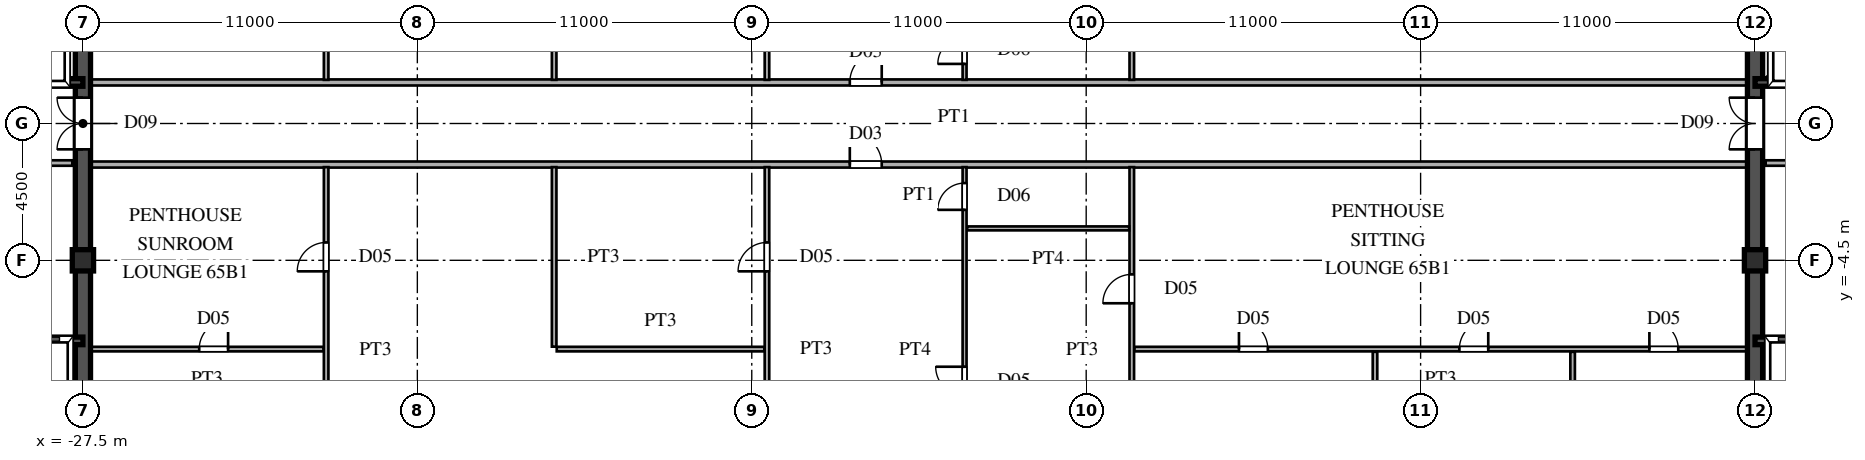
"""IFC4 building model, lengths in metres.
Left out: names, types, materials, properties, quantities, classifications, styles, units other than length and angle.
Written with IfcOpenShell. Run it as: python <this file> out.ifc"""

import sys

from ifc_helpers import new_model, si_unit, direction, frame, frame_2d, origin, origin_2d, place, context, subcontext, project, spatial, rectangle, hollow_rectangle, extrude, source, transform, mapped, element, fill, save


model = new_model("IFC4")
c1 = context("Model", 3, precision=1e-05, world=origin(), true_north=direction((0.0, 1.0)))
c2 = subcontext(c1, "Body", "Model", "MODEL_VIEW")
j1 = project(units=[si_unit("LENGTHUNIT", "METRE"), si_unit("PLANEANGLEUNIT", "RADIAN")], contexts=[c1])
p1 = place(None, origin())
s1 = spatial("IfcSite", under=j1, at=p1, CompositionType="ELEMENT")
p2 = place(p1, origin())
s2 = spatial("IfcBuilding", under=s1, at=p2, CompositionType="ELEMENT")
p3 = place(p2, frame((0.0, 0.0, 246.9)))
s3 = spatial("IfcBuildingStorey", under=s2, at=p3, CompositionType="ELEMENT", Elevation=246.9)
m1 = source(origin(), c2, "Body", "SweptSolid", [
    extrude(hollow_rectangle(XDim=0.7, YDim=0.7, WallThickness=0.03, at=origin_2d()), origin(), (0.0, 0.0, 1.0), 3.75),
])
for number, where, z_axis, x_axis in (
    (1, (-27.5, -4.5, 0.0), (0.0, 0.0, 1.0), (1.0, 0.0, 0.0)),
    (2, (27.5, -4.5, 0.0), (0.0, 0.0, 1.0), (1.0, 0.0, 0.0)),
):
    element("IfcColumn", number, at=place(p3, frame(where, z_axis=z_axis, x_axis=x_axis)), inside=s3, PredefinedType="COLUMN", context=c2, shape_type="MappedRepresentation", body=[
        mapped(m1, transform((0.0, 0.0, 0.0), scale=1.0)),
    ])
for number, where, z_axis, x_axis in (
    (3, (-27.5, -13.5, 0.0), (0.0, 0.0, 1.0), (0.0, 1.0, 0.0)),
    (4, (-27.5, 1.3, 0.0), (0.0, 0.0, 1.0), (0.0, 1.0, 0.0)),
):
    element("IfcWall", number, at=place(p3, frame(where, z_axis=z_axis, x_axis=x_axis)), inside=s3, PredefinedType="SHEAR", context=c2, shape_type="SweptSolid", body=[
        extrude(rectangle(XDim=12.2, YDim=0.5, at=frame_2d((6.1, 0.0))), origin(), (0.0, 0.0, 1.0), 3.53),
    ])
p4 = place(p3, frame((-27.5, -1.3, 0.0), z_axis=(0.0, 0.0, 1.0), x_axis=(0.0, 1.0, 0.0)))
e5 = element("IfcWall", 5, at=p4, inside=s3, PredefinedType="SHEAR", context=c2, shape_type="SweptSolid", body=[
    extrude(rectangle(XDim=2.6, YDim=0.5, at=frame_2d((1.3, 0.0))), origin(), (0.0, 0.0, 1.0), 3.53),
])
p5 = place(p4, frame((0.45, 0.0, 0.0)))
e6 = element("IfcOpeningElement", 6, at=p5, cuts=e5, PredefinedType="OPENING", context=c2, shape_type="SweptSolid", body=[
    extrude(rectangle(XDim=1.7, YDim=2.35, at=frame_2d((0.85, 1.175))), frame((0.0, 0.26, 0.0), z_axis=(0.0, -1.0, 0.0), x_axis=(1.0, 0.0, 0.0)), (0.0, 0.0, 1.0), 0.52),
])
for number, where, z_axis, x_axis in (
    (7, (-30.3, -7.15, 0.0), (0.0, 0.0, 1.0), (1.0, 0.0, 0.0)),
    (8, (-30.3, 1.35, 0.0), (0.0, 0.0, 1.0), (1.0, 0.0, 0.0)),
):
    element("IfcWall", number, at=place(p3, frame(where, z_axis=z_axis, x_axis=x_axis)), inside=s3, PredefinedType="SHEAR", context=c2, shape_type="SweptSolid", body=[
        extrude(rectangle(XDim=2.8, YDim=0.25, at=frame_2d((1.4, 0.0))), origin(), (0.0, 0.0, 1.0), 3.53),
    ])
p6 = place(p3, frame((-33.02, -1.3, 0.0), z_axis=(0.0, 0.0, 1.0), x_axis=(1.0, 0.0, 0.0)))
e9 = element("IfcWall", 9, at=p6, inside=s3, PredefinedType="PARTITIONING", context=c2, shape_type="SweptSolid", body=[
    extrude(rectangle(XDim=5.17, YDim=0.18, at=frame_2d((2.585, 0.0))), origin(), (0.0, 0.0, 1.0), 3.53),
])
p7 = place(p6, frame((2.01, 0.0, 0.0)))
e10 = element("IfcOpeningElement", 10, at=p7, cuts=e9, PredefinedType="OPENING", context=c2, shape_type="SweptSolid", body=[
    extrude(rectangle(XDim=1.15, YDim=2.2, at=frame_2d((0.575, 1.1))), frame((0.0, 0.1, 0.0), z_axis=(0.0, -1.0, 0.0), x_axis=(1.0, 0.0, 0.0)), (0.0, 0.0, 1.0), 0.2),
])
for number, where, z_axis, x_axis in (
    (11, (27.5, -13.5, 0.0), (0.0, 0.0, 1.0), (0.0, 1.0, 0.0)),
    (12, (27.5, 1.3, 0.0), (0.0, 0.0, 1.0), (0.0, 1.0, 0.0)),
):
    element("IfcWall", number, at=place(p3, frame(where, z_axis=z_axis, x_axis=x_axis)), inside=s3, PredefinedType="SHEAR", context=c2, shape_type="SweptSolid", body=[
        extrude(rectangle(XDim=12.2, YDim=0.5, at=frame_2d((6.1, 0.0))), origin(), (0.0, 0.0, 1.0), 3.53),
    ])
p8 = place(p3, frame((27.5, -1.3, 0.0), z_axis=(0.0, 0.0, 1.0), x_axis=(0.0, 1.0, 0.0)))
e13 = element("IfcWall", 13, at=p8, inside=s3, PredefinedType="SHEAR", context=c2, shape_type="SweptSolid", body=[
    extrude(rectangle(XDim=2.6, YDim=0.5, at=frame_2d((1.3, 0.0))), origin(), (0.0, 0.0, 1.0), 3.53),
])
p9 = place(p8, frame((0.45, 0.0, 0.0)))
e14 = element("IfcOpeningElement", 14, at=p9, cuts=e13, PredefinedType="OPENING", context=c2, shape_type="SweptSolid", body=[
    extrude(rectangle(XDim=1.7, YDim=2.35, at=frame_2d((0.85, 1.175))), frame((0.0, 0.26, 0.0), z_axis=(0.0, -1.0, 0.0), x_axis=(1.0, 0.0, 0.0)), (0.0, 0.0, 1.0), 0.52),
])
for number, where, z_axis, x_axis in (
    (15, (27.5, -7.15, 0.0), (0.0, 0.0, 1.0), (1.0, 0.0, 0.0)),
    (16, (27.5, 1.35, 0.0), (0.0, 0.0, 1.0), (1.0, 0.0, 0.0)),
):
    element("IfcWall", number, at=place(p3, frame(where, z_axis=z_axis, x_axis=x_axis)), inside=s3, PredefinedType="SHEAR", context=c2, shape_type="SweptSolid", body=[
        extrude(rectangle(XDim=2.8, YDim=0.25, at=frame_2d((1.4, 0.0))), origin(), (0.0, 0.0, 1.0), 3.53),
    ])
p10 = place(p3, frame((27.85, -1.3, 0.0), z_axis=(0.0, 0.0, 1.0), x_axis=(1.0, 0.0, 0.0)))
e17 = element("IfcWall", 17, at=p10, inside=s3, PredefinedType="PARTITIONING", context=c2, shape_type="SweptSolid", body=[
    extrude(rectangle(XDim=5.17, YDim=0.18, at=frame_2d((2.585, 0.0))), origin(), (0.0, 0.0, 1.0), 3.53),
])
p11 = place(p10, frame((2.01, 0.0, 0.0)))
e18 = element("IfcOpeningElement", 18, at=p11, cuts=e17, PredefinedType="OPENING", context=c2, shape_type="SweptSolid", body=[
    extrude(rectangle(XDim=1.15, YDim=2.2, at=frame_2d((0.575, 1.1))), frame((0.0, 0.1, 0.0), z_axis=(0.0, -1.0, 0.0), x_axis=(1.0, 0.0, 0.0)), (0.0, 0.0, 1.0), 0.2),
])
p12 = place(p3, frame((-27.245, -7.42, 0.0), z_axis=(0.0, 0.0, 1.0), x_axis=(1.0, 0.0, 0.0)))
e19 = element("IfcWall", 19, at=p12, inside=s3, PredefinedType="PARTITIONING", context=c2, shape_type="SweptSolid", body=[
    extrude(rectangle(XDim=7.66, YDim=0.15, at=frame_2d((3.83, 0.0))), origin(), (0.0, 0.0, 1.0), 3.53),
])
p13 = place(p12, frame((3.57, 0.0, 0.0)))
e20 = element("IfcOpeningElement", 20, at=p13, cuts=e19, PredefinedType="OPENING", context=c2, shape_type="SweptSolid", body=[
    extrude(rectangle(XDim=0.95, YDim=2.15, at=frame_2d((0.475, 1.075))), frame((0.0, 0.085, 0.0), z_axis=(0.0, -1.0, 0.0), x_axis=(1.0, 0.0, 0.0)), (0.0, 0.0, 1.0), 0.17),
])
p14 = place(p3, frame((-11.915, -7.42, 0.0), z_axis=(0.0, 0.0, 1.0), x_axis=(1.0, 0.0, 0.0)))
e21 = element("IfcWall", 21, at=p14, inside=s3, PredefinedType="PARTITIONING", context=c2, shape_type="SweptSolid", body=[
    extrude(rectangle(XDim=6.83, YDim=0.15, at=frame_2d((3.415, 0.0))), origin(), (0.0, 0.0, 1.0), 3.53),
])
p15 = place(p3, frame((7.085, -7.42, 0.0), z_axis=(0.0, 0.0, 1.0), x_axis=(1.0, 0.0, 0.0)))
e22 = element("IfcWall", 22, at=p15, inside=s3, PredefinedType="PARTITIONING", context=c2, shape_type="SweptSolid", body=[
    extrude(rectangle(XDim=20.16, YDim=0.15, at=frame_2d((10.08, 0.0))), origin(), (0.0, 0.0, 1.0), 3.53),
])
p16 = place(p15, frame((3.44, 0.0, 0.0)))
e23 = element("IfcOpeningElement", 23, at=p16, cuts=e22, PredefinedType="OPENING", context=c2, shape_type="SweptSolid", body=[
    extrude(rectangle(XDim=0.95, YDim=2.15, at=frame_2d((0.475, 1.075))), frame((0.0, 0.085, 0.0), z_axis=(0.0, -1.0, 0.0), x_axis=(1.0, 0.0, 0.0)), (0.0, 0.0, 1.0), 0.17),
])
p17 = place(p15, frame((10.69, 0.0, 0.0)))
e24 = element("IfcOpeningElement", 24, at=p17, cuts=e22, PredefinedType="OPENING", context=c2, shape_type="SweptSolid", body=[
    extrude(rectangle(XDim=0.95, YDim=2.15, at=frame_2d((0.475, 1.075))), frame((0.0, 0.085, 0.0), z_axis=(0.0, -1.0, 0.0), x_axis=(1.0, 0.0, 0.0)), (0.0, 0.0, 1.0), 0.17),
])
p18 = place(p15, frame((16.94, 0.0, 0.0)))
e25 = element("IfcOpeningElement", 25, at=p18, cuts=e22, PredefinedType="OPENING", context=c2, shape_type="SweptSolid", body=[
    extrude(rectangle(XDim=0.95, YDim=2.15, at=frame_2d((0.475, 1.075))), frame((0.0, 0.085, 0.0), z_axis=(0.0, -1.0, 0.0), x_axis=(1.0, 0.0, 0.0)), (0.0, 0.0, 1.0), 0.17),
])
p19 = place(p3, frame((1.585, -3.45, 0.0), z_axis=(0.0, 0.0, 1.0), x_axis=(1.0, 0.0, 0.0)))
e26 = element("IfcWall", 26, at=p19, inside=s3, PredefinedType="PARTITIONING", context=c2, shape_type="SweptSolid", body=[
    extrude(rectangle(XDim=5.33, YDim=0.13, at=frame_2d((2.665, 0.0))), origin(), (0.0, 0.0, 1.0), 3.53),
])
p20 = place(p3, frame((-27.245, -1.35, 0.0), z_axis=(0.0, 0.0, 1.0), x_axis=(1.0, 0.0, 0.0)))
e27 = element("IfcWall", 27, at=p20, inside=s3, PredefinedType="PARTITIONING", context=c2, shape_type="SweptSolid", body=[
    extrude(rectangle(XDim=54.49, YDim=0.2, at=frame_2d((27.245, 0.0))), origin(), (0.0, 0.0, 1.0), 3.53),
])
p21 = place(p20, frame((24.97, 0.0, 0.0)))
e28 = element("IfcOpeningElement", 28, at=p21, cuts=e27, PredefinedType="OPENING", context=c2, shape_type="SweptSolid", body=[
    extrude(rectangle(XDim=1.05, YDim=2.25, at=frame_2d((0.525, 1.125))), frame((0.0, 0.11, 0.0), z_axis=(0.0, -1.0, 0.0), x_axis=(1.0, 0.0, 0.0)), (0.0, 0.0, 1.0), 0.22),
])
p22 = place(p3, frame((-27.245, 1.35, 0.0), z_axis=(0.0, 0.0, 1.0), x_axis=(1.0, 0.0, 0.0)))
e29 = element("IfcWall", 29, at=p22, inside=s3, PredefinedType="PARTITIONING", context=c2, shape_type="SweptSolid", body=[
    extrude(rectangle(XDim=54.49, YDim=0.2, at=frame_2d((27.245, 0.0))), origin(), (0.0, 0.0, 1.0), 3.53),
])
p23 = place(p22, frame((24.97, 0.0, 0.0)))
e30 = element("IfcOpeningElement", 30, at=p23, cuts=e29, PredefinedType="OPENING", context=c2, shape_type="SweptSolid", body=[
    extrude(rectangle(XDim=1.05, YDim=2.25, at=frame_2d((0.525, 1.125))), frame((0.0, 0.11, 0.0), z_axis=(0.0, -1.0, 0.0), x_axis=(1.0, 0.0, 0.0)), (0.0, 0.0, 1.0), 0.22),
])
p24 = place(p3, frame((-19.5, -13.5, 0.0), z_axis=(0.0, 0.0, 1.0), x_axis=(0.0, 1.0, 0.0)))
e31 = element("IfcWall", 31, at=p24, inside=s3, PredefinedType="PARTITIONING", context=c2, shape_type="SweptSolid", body=[
    extrude(rectangle(XDim=12.065, YDim=0.15, at=frame_2d((6.032, 0.0))), origin(), (0.0, 0.0, 1.0), 3.53),
])
p25 = place(p24, frame((8.637, 0.0, 0.0)))
e32 = element("IfcOpeningElement", 32, at=p25, cuts=e31, PredefinedType="OPENING", context=c2, shape_type="SweptSolid", body=[
    extrude(rectangle(XDim=0.95, YDim=2.15, at=frame_2d((0.475, 1.075))), frame((0.0, 0.085, 0.0), z_axis=(0.0, -1.0, 0.0), x_axis=(1.0, 0.0, 0.0)), (0.0, 0.0, 1.0), 0.17),
])
p26 = place(p3, frame((-19.5, 1.435, 0.0), z_axis=(0.0, 0.0, 1.0), x_axis=(0.0, 1.0, 0.0)))
e33 = element("IfcWall", 33, at=p26, inside=s3, PredefinedType="PARTITIONING", context=c2, shape_type="SweptSolid", body=[
    extrude(rectangle(XDim=12.065, YDim=0.15, at=frame_2d((6.032, 0.0))), origin(), (0.0, 0.0, 1.0), 3.53),
])
p27 = place(p26, frame((2.478, 0.0, 0.0)))
e34 = element("IfcOpeningElement", 34, at=p27, cuts=e33, PredefinedType="OPENING", context=c2, shape_type="SweptSolid", body=[
    extrude(rectangle(XDim=0.95, YDim=2.15, at=frame_2d((0.475, 1.075))), frame((0.0, 0.085, 0.0), z_axis=(0.0, -1.0, 0.0), x_axis=(1.0, 0.0, 0.0)), (0.0, 0.0, 1.0), 0.17),
])
for number, where, z_axis, x_axis in (
    (35, (-12.0, -7.34, 0.0), (0.0, 0.0, 1.0), (0.0, 1.0, 0.0)),
    (36, (-12.0, 1.435, 0.0), (0.0, 0.0, 1.0), (0.0, 1.0, 0.0)),
):
    element("IfcWall", number, at=place(p3, frame(where, z_axis=z_axis, x_axis=x_axis)), inside=s3, PredefinedType="PARTITIONING", context=c2, shape_type="SweptSolid", body=[
        extrude(rectangle(XDim=5.905, YDim=0.15, at=frame_2d((2.953, 0.0))), origin(), (0.0, 0.0, 1.0), 3.53),
    ])
p28 = place(p3, frame((-5.0, -13.39, 0.0), z_axis=(0.0, 0.0, 1.0), x_axis=(0.0, 1.0, 0.0)))
e37 = element("IfcWall", 37, at=p28, inside=s3, PredefinedType="PARTITIONING", context=c2, shape_type="SweptSolid", body=[
    extrude(rectangle(XDim=11.955, YDim=0.15, at=frame_2d((5.978, 0.0))), origin(), (0.0, 0.0, 1.0), 3.53),
])
p29 = place(p28, frame((8.528, 0.0, 0.0)))
e38 = element("IfcOpeningElement", 38, at=p29, cuts=e37, PredefinedType="OPENING", context=c2, shape_type="SweptSolid", body=[
    extrude(rectangle(XDim=0.95, YDim=2.15, at=frame_2d((0.475, 1.075))), frame((0.0, 0.085, 0.0), z_axis=(0.0, -1.0, 0.0), x_axis=(1.0, 0.0, 0.0)), (0.0, 0.0, 1.0), 0.17),
])
p30 = place(p28, frame((2.452, 0.0, 0.0)))
e39 = element("IfcOpeningElement", 39, at=p30, cuts=e37, PredefinedType="OPENING", context=c2, shape_type="SweptSolid", body=[
    extrude(rectangle(XDim=0.95, YDim=2.15, at=frame_2d((0.475, 1.075))), frame((0.0, 0.085, 0.0), z_axis=(0.0, -1.0, 0.0), x_axis=(1.0, 0.0, 0.0)), (0.0, 0.0, 1.0), 0.17),
])
p31 = place(p3, frame((-5.0, 1.435, 0.0), z_axis=(0.0, 0.0, 1.0), x_axis=(0.0, 1.0, 0.0)))
e40 = element("IfcWall", 40, at=p31, inside=s3, PredefinedType="PARTITIONING", context=c2, shape_type="SweptSolid", body=[
    extrude(rectangle(XDim=11.955, YDim=0.15, at=frame_2d((5.978, 0.0))), origin(), (0.0, 0.0, 1.0), 3.53),
])
p32 = place(p31, frame((2.478, 0.0, 0.0)))
e41 = element("IfcOpeningElement", 41, at=p32, cuts=e40, PredefinedType="OPENING", context=c2, shape_type="SweptSolid", body=[
    extrude(rectangle(XDim=0.95, YDim=2.15, at=frame_2d((0.475, 1.075))), frame((0.0, 0.085, 0.0), z_axis=(0.0, -1.0, 0.0), x_axis=(1.0, 0.0, 0.0)), (0.0, 0.0, 1.0), 0.17),
])
p33 = place(p31, frame((8.552, 0.0, 0.0)))
e42 = element("IfcOpeningElement", 42, at=p33, cuts=e40, PredefinedType="OPENING", context=c2, shape_type="SweptSolid", body=[
    extrude(rectangle(XDim=0.95, YDim=2.15, at=frame_2d((0.475, 1.075))), frame((0.0, 0.085, 0.0), z_axis=(0.0, -1.0, 0.0), x_axis=(1.0, 0.0, 0.0)), (0.0, 0.0, 1.0), 0.17),
])
p34 = place(p3, frame((1.5, -13.5, 0.0), z_axis=(0.0, 0.0, 1.0), x_axis=(0.0, 1.0, 0.0)))
e43 = element("IfcWall", 43, at=p34, inside=s3, PredefinedType="PARTITIONING", context=c2, shape_type="SweptSolid", body=[
    extrude(rectangle(XDim=12.065, YDim=0.13, at=frame_2d((6.032, 0.0))), origin(), (0.0, 0.0, 1.0), 3.53),
])
p35 = place(p34, frame((10.66, 0.0, 0.0)))
e44 = element("IfcOpeningElement", 44, at=p35, cuts=e43, PredefinedType="OPENING", context=c2, shape_type="SweptSolid", body=[
    extrude(rectangle(XDim=0.88, YDim=2.1, at=frame_2d((0.44, 1.05))), frame((0.0, 0.075, 0.0), z_axis=(0.0, -1.0, 0.0), x_axis=(1.0, 0.0, 0.0)), (0.0, 0.0, 1.0), 0.15),
])
p36 = place(p34, frame((4.55, 0.0, 0.0)))
e45 = element("IfcOpeningElement", 45, at=p36, cuts=e43, PredefinedType="OPENING", context=c2, shape_type="SweptSolid", body=[
    extrude(rectangle(XDim=0.95, YDim=2.15, at=frame_2d((0.475, 1.075))), frame((0.0, 0.075, 0.0), z_axis=(0.0, -1.0, 0.0), x_axis=(1.0, 0.0, 0.0)), (0.0, 0.0, 1.0), 0.15),
])
p37 = place(p3, frame((1.5, 1.435, 0.0), z_axis=(0.0, 0.0, 1.0), x_axis=(0.0, 1.0, 0.0)))
e46 = element("IfcWall", 46, at=p37, inside=s3, PredefinedType="PARTITIONING", context=c2, shape_type="SweptSolid", body=[
    extrude(rectangle(XDim=12.065, YDim=0.13, at=frame_2d((6.032, 0.0))), origin(), (0.0, 0.0, 1.0), 3.53),
])
p38 = place(p37, frame((0.525, 0.0, 0.0)))
e47 = element("IfcOpeningElement", 47, at=p38, cuts=e46, PredefinedType="OPENING", context=c2, shape_type="SweptSolid", body=[
    extrude(rectangle(XDim=0.88, YDim=2.1, at=frame_2d((0.44, 1.05))), frame((0.0, 0.075, 0.0), z_axis=(0.0, -1.0, 0.0), x_axis=(1.0, 0.0, 0.0)), (0.0, 0.0, 1.0), 0.15),
])
p39 = place(p37, frame((6.565, 0.0, 0.0)))
e48 = element("IfcOpeningElement", 48, at=p39, cuts=e46, PredefinedType="OPENING", context=c2, shape_type="SweptSolid", body=[
    extrude(rectangle(XDim=0.95, YDim=2.15, at=frame_2d((0.475, 1.075))), frame((0.0, 0.075, 0.0), z_axis=(0.0, -1.0, 0.0), x_axis=(1.0, 0.0, 0.0)), (0.0, 0.0, 1.0), 0.15),
])
p40 = place(p3, frame((7.0, -13.5, 0.0), z_axis=(0.0, 0.0, 1.0), x_axis=(0.0, 1.0, 0.0)))
e49 = element("IfcWall", 49, at=p40, inside=s3, PredefinedType="PARTITIONING", context=c2, shape_type="SweptSolid", body=[
    extrude(rectangle(XDim=12.065, YDim=0.15, at=frame_2d((6.032, 0.0))), origin(), (0.0, 0.0, 1.0), 3.53),
])
p41 = place(p40, frame((7.587, 0.0, 0.0)))
e50 = element("IfcOpeningElement", 50, at=p41, cuts=e49, PredefinedType="OPENING", context=c2, shape_type="SweptSolid", body=[
    extrude(rectangle(XDim=0.95, YDim=2.15, at=frame_2d((0.475, 1.075))), frame((0.0, 0.085, 0.0), z_axis=(0.0, -1.0, 0.0), x_axis=(1.0, 0.0, 0.0)), (0.0, 0.0, 1.0), 0.17),
])
p42 = place(p3, frame((7.0, 1.435, 0.0), z_axis=(0.0, 0.0, 1.0), x_axis=(0.0, 1.0, 0.0)))
e51 = element("IfcWall", 51, at=p42, inside=s3, PredefinedType="PARTITIONING", context=c2, shape_type="SweptSolid", body=[
    extrude(rectangle(XDim=12.065, YDim=0.15, at=frame_2d((6.032, 0.0))), origin(), (0.0, 0.0, 1.0), 3.53),
])
p43 = place(p42, frame((3.528, 0.0, 0.0)))
e52 = element("IfcOpeningElement", 52, at=p43, cuts=e51, PredefinedType="OPENING", context=c2, shape_type="SweptSolid", body=[
    extrude(rectangle(XDim=0.95, YDim=2.15, at=frame_2d((0.475, 1.075))), frame((0.0, 0.085, 0.0), z_axis=(0.0, -1.0, 0.0), x_axis=(1.0, 0.0, 0.0)), (0.0, 0.0, 1.0), 0.17),
])
p44 = place(p3, frame((15.0, -13.5, 0.0), z_axis=(0.0, 0.0, 1.0), x_axis=(0.0, 1.0, 0.0)))
e53 = element("IfcWall", 53, at=p44, inside=s3, PredefinedType="PARTITIONING", context=c2, shape_type="SweptSolid", body=[
    extrude(rectangle(XDim=5.99, YDim=0.15, at=frame_2d((2.995, 0.0))), origin(), (0.0, 0.0, 1.0), 3.53),
])
p45 = place(p3, frame((21.5, -13.39, 0.0), z_axis=(0.0, 0.0, 1.0), x_axis=(0.0, 1.0, 0.0)))
e54 = element("IfcWall", 54, at=p45, inside=s3, PredefinedType="PARTITIONING", context=c2, shape_type="SweptSolid", body=[
    extrude(rectangle(XDim=5.88, YDim=0.15, at=frame_2d((2.94, 0.0))), origin(), (0.0, 0.0, 1.0), 3.53),
])
m2 = source(origin(), c2, "Body", "SweptSolid", [
    extrude(rectangle(XDim=1.7, YDim=2.35, at=frame_2d((0.85, 1.175))), frame((0.0, 0.025, 0.0), z_axis=(0.0, -1.0, 0.0), x_axis=(1.0, 0.0, 0.0)), (0.0, 0.0, 1.0), 0.05),
])
p46 = place(p5, origin())
e55 = element("IfcDoor", 55, at=p46, inside=s3, OperationType="DOUBLE_SWING_LEFT", PredefinedType="DOOR", context=c2, shape_type="MappedRepresentation", body=[
    mapped(m2, transform((0.0, 0.0, 0.0), scale=1.0)),
])
fill(e6, e55)
p47 = place(p9, origin())
e56 = element("IfcDoor", 56, at=p47, inside=s3, OperationType="DOUBLE_SWING_LEFT", PredefinedType="DOOR", context=c2, shape_type="MappedRepresentation", body=[
    mapped(m2, transform((0.0, 0.0, 0.0), scale=1.0)),
])
fill(e14, e56)
m3 = source(origin(), c2, "Body", "SweptSolid", [
    extrude(rectangle(XDim=0.95, YDim=2.15, at=frame_2d((0.475, 1.075))), frame((0.0, 0.025, 0.0), z_axis=(0.0, -1.0, 0.0), x_axis=(1.0, 0.0, 0.0)), (0.0, 0.0, 1.0), 0.05),
])
p48 = place(p13, origin())
e57 = element("IfcDoor", 57, at=p48, inside=s3, OperationType="SINGLE_SWING_RIGHT", PredefinedType="DOOR", context=c2, shape_type="MappedRepresentation", body=[
    mapped(m3, transform((0.0, 0.0, 0.0), scale=1.0)),
])
fill(e20, e57)
p49 = place(p16, origin())
e58 = element("IfcDoor", 58, at=p49, inside=s3, OperationType="SINGLE_SWING_LEFT", PredefinedType="DOOR", context=c2, shape_type="MappedRepresentation", body=[
    mapped(m3, transform((0.0, 0.0, 0.0), scale=1.0)),
])
fill(e23, e58)
p50 = place(p17, origin())
e59 = element("IfcDoor", 59, at=p50, inside=s3, OperationType="SINGLE_SWING_RIGHT", PredefinedType="DOOR", context=c2, shape_type="MappedRepresentation", body=[
    mapped(m3, transform((0.0, 0.0, 0.0), scale=1.0)),
])
fill(e24, e59)
p51 = place(p18, origin())
e60 = element("IfcDoor", 60, at=p51, inside=s3, OperationType="SINGLE_SWING_LEFT", PredefinedType="DOOR", context=c2, shape_type="MappedRepresentation", body=[
    mapped(m3, transform((0.0, 0.0, 0.0), scale=1.0)),
])
fill(e25, e60)
m4 = source(origin(), c2, "Body", "SweptSolid", [
    extrude(rectangle(XDim=1.05, YDim=2.25, at=frame_2d((0.525, 1.125))), frame((0.0, 0.025, 0.0), z_axis=(0.0, -1.0, 0.0), x_axis=(1.0, 0.0, 0.0)), (0.0, 0.0, 1.0), 0.05),
])
p52 = place(p21, origin())
e61 = element("IfcDoor", 61, at=p52, inside=s3, OperationType="SINGLE_SWING_LEFT", PredefinedType="DOOR", context=c2, shape_type="MappedRepresentation", body=[
    mapped(m4, transform((0.0, 0.0, 0.0), scale=1.0)),
])
fill(e28, e61)
p53 = place(p23, origin())
e62 = element("IfcDoor", 62, at=p53, inside=s3, OperationType="SINGLE_SWING_RIGHT", PredefinedType="DOOR", context=c2, shape_type="MappedRepresentation", body=[
    mapped(m4, transform((0.0, 0.0, 0.0), scale=1.0)),
])
fill(e30, e62)
p54 = place(p25, origin())
e63 = element("IfcDoor", 63, at=p54, inside=s3, OperationType="SINGLE_SWING_LEFT", PredefinedType="DOOR", context=c2, shape_type="MappedRepresentation", body=[
    mapped(m3, transform((0.0, 0.0, 0.0), scale=1.0)),
])
fill(e32, e63)
p55 = place(p29, origin())
e64 = element("IfcDoor", 64, at=p55, inside=s3, OperationType="SINGLE_SWING_LEFT", PredefinedType="DOOR", context=c2, shape_type="MappedRepresentation", body=[
    mapped(m3, transform((0.0, 0.0, 0.0), scale=1.0)),
])
fill(e38, e64)
m5 = source(origin(), c2, "Body", "SweptSolid", [
    extrude(rectangle(XDim=0.88, YDim=2.1, at=frame_2d((0.44, 1.05))), frame((0.0, 0.025, 0.0), z_axis=(0.0, -1.0, 0.0), x_axis=(1.0, 0.0, 0.0)), (0.0, 0.0, 1.0), 0.05),
])
p56 = place(p35, origin())
e65 = element("IfcDoor", 65, at=p56, inside=s3, OperationType="SINGLE_SWING_LEFT", PredefinedType="DOOR", context=c2, shape_type="MappedRepresentation", body=[
    mapped(m5, transform((0.0, 0.0, 0.0), scale=1.0)),
])
fill(e44, e65)
p57 = place(p36, origin())
e66 = element("IfcDoor", 66, at=p57, inside=s3, OperationType="SINGLE_SWING_RIGHT", PredefinedType="DOOR", context=c2, shape_type="MappedRepresentation", body=[
    mapped(m3, transform((0.0, 0.0, 0.0), scale=1.0)),
])
fill(e45, e66)
p58 = place(p38, origin())
e67 = element("IfcDoor", 67, at=p58, inside=s3, OperationType="SINGLE_SWING_LEFT", PredefinedType="DOOR", context=c2, shape_type="MappedRepresentation", body=[
    mapped(m5, transform((0.0, 0.0, 0.0), scale=1.0)),
])
fill(e47, e67)
p59 = place(p41, origin())
e68 = element("IfcDoor", 68, at=p59, inside=s3, OperationType="SINGLE_SWING_LEFT", PredefinedType="DOOR", context=c2, shape_type="MappedRepresentation", body=[
    mapped(m3, transform((0.0, 0.0, 0.0), scale=1.0)),
])
fill(e50, e68)
save(model, sys.argv[1])
